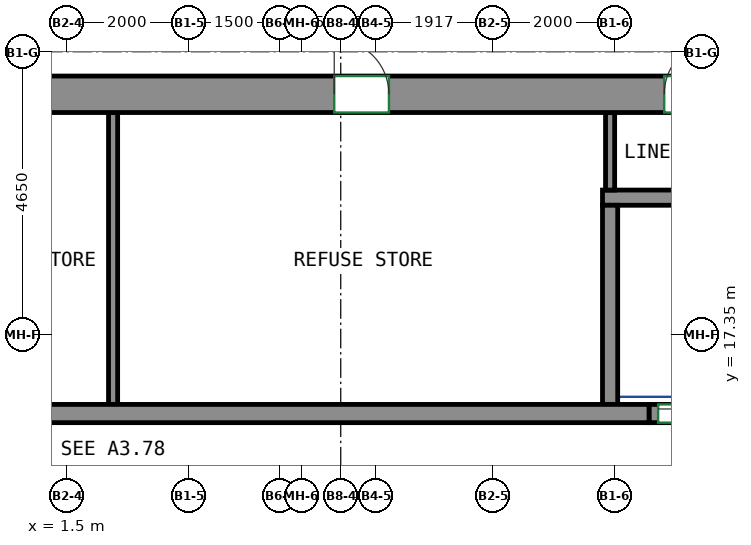
"""IFC4 building model, lengths in metres.
Left out: names, types, materials, properties, quantities, classifications, styles, units other than length and angle.
Written with IfcOpenShell. Run it as: python <this file> out.ifc"""

import sys

from ifc_helpers import new_model, si_unit, direction, frame, frame_2d, origin, place, context, subcontext, project, spatial, rectangle, extrude, source, transform, mapped, element, fill, save


model = new_model("IFC4")
c1 = context("Model", 3, precision=1e-05, world=origin(), true_north=direction((0.0, 1.0)))
c2 = subcontext(c1, "Body", "Model", "MODEL_VIEW")
j1 = project(units=[si_unit("LENGTHUNIT", "METRE"), si_unit("PLANEANGLEUNIT", "RADIAN")], contexts=[c1])
p1 = place(None, origin())
s1 = spatial("IfcSite", under=j1, at=p1, CompositionType="ELEMENT")
p2 = place(p1, origin())
s2 = spatial("IfcBuilding", under=s1, at=p2, CompositionType="ELEMENT")
p3 = place(p2, frame((0.0, 0.0, 308.6)))
s3 = spatial("IfcBuildingStorey", under=s2, at=p3, CompositionType="ELEMENT", Elevation=308.6)
m1 = source(origin(), c2, "Body", "SweptSolid", [
    extrude(rectangle(XDim=33.3, YDim=0.6, at=frame_2d((16.65, 0.0))), origin(), (0.0, 0.0, 1.0), 3.12),
])
p4 = place(p3, frame((-15.6, 21.3, 0.0), z_axis=(0.0, 0.0, 1.0), x_axis=(1.0, 0.0, 0.0)))
e1 = element("IfcWall", 1, at=p4, inside=s3, PredefinedType="SHEAR", context=c2, shape_type="MappedRepresentation", body=[
    mapped(m1, transform((0.0, 0.0, 0.0))),
])
p5 = place(p4, frame((5.708, 0.0, 0.0)))
e2 = element("IfcOpeningElement", 2, at=p5, cuts=e1, PredefinedType="OPENING", context=c2, shape_type="SweptSolid", body=[
    extrude(rectangle(XDim=0.9, YDim=2.1, at=frame_2d((0.45, 1.05))), frame((0.0, 0.31, 0.0), z_axis=(0.0, -1.0, 0.0), x_axis=(1.0, 0.0, 0.0)), (0.0, 0.0, 1.0), 0.62),
])
p6 = place(p4, frame((10.773, 0.0, 0.0)))
e3 = element("IfcOpeningElement", 3, at=p6, cuts=e1, PredefinedType="OPENING", context=c2, shape_type="SweptSolid", body=[
    extrude(rectangle(XDim=0.9, YDim=2.1, at=frame_2d((0.45, 1.05))), frame((0.0, 0.31, 0.0), z_axis=(0.0, -1.0, 0.0), x_axis=(1.0, 0.0, 0.0)), (0.0, 0.0, 1.0), 0.62),
])
p7 = place(p4, frame((15.838, 0.0, 0.0)))
e4 = element("IfcOpeningElement", 4, at=p7, cuts=e1, PredefinedType="OPENING", context=c2, shape_type="SweptSolid", body=[
    extrude(rectangle(XDim=0.9, YDim=2.1, at=frame_2d((0.45, 1.05))), frame((0.0, 0.31, 0.0), z_axis=(0.0, -1.0, 0.0), x_axis=(1.0, 0.0, 0.0)), (0.0, 0.0, 1.0), 0.62),
])
p8 = place(p4, frame((21.493, 0.0, 0.0)))
e5 = element("IfcOpeningElement", 5, at=p8, cuts=e1, PredefinedType="OPENING", context=c2, shape_type="SweptSolid", body=[
    extrude(rectangle(XDim=0.9, YDim=2.1, at=frame_2d((0.45, 1.05))), frame((0.0, 0.31, 0.0), z_axis=(0.0, -1.0, 0.0), x_axis=(1.0, 0.0, 0.0)), (0.0, 0.0, 1.0), 0.62),
])
p9 = place(p4, frame((26.92, 0.0, 0.0)))
e6 = element("IfcOpeningElement", 6, at=p9, cuts=e1, PredefinedType="OPENING", context=c2, shape_type="SweptSolid", body=[
    extrude(rectangle(XDim=0.9, YDim=2.1, at=frame_2d((0.45, 1.05))), frame((0.0, 0.31, 0.0), z_axis=(0.0, -1.0, 0.0), x_axis=(1.0, 0.0, 0.0)), (0.0, 0.0, 1.0), 0.62),
])
p10 = place(p4, frame((2.125, 0.0, 0.0)))
e7 = element("IfcOpeningElement", 7, at=p10, cuts=e1, PredefinedType="OPENING", context=c2, shape_type="SweptSolid", body=[
    extrude(rectangle(XDim=0.9, YDim=2.1, at=frame_2d((0.45, 1.05))), frame((0.0, 0.31, 0.0), z_axis=(0.0, -1.0, 0.0), x_axis=(1.0, 0.0, 0.0)), (0.0, 0.0, 1.0), 0.62),
])
p11 = place(p4, frame((30.275, 0.0, 0.0)))
e8 = element("IfcOpeningElement", 8, at=p11, cuts=e1, PredefinedType="OPENING", context=c2, shape_type="SweptSolid", body=[
    extrude(rectangle(XDim=0.9, YDim=2.1, at=frame_2d((0.45, 1.05))), frame((0.0, 0.31, 0.0), z_axis=(0.0, -1.0, 0.0), x_axis=(1.0, 0.0, 0.0)), (0.0, 0.0, 1.0), 0.62),
])
m2 = source(origin(), c2, "Body", "SweptSolid", [
    extrude(rectangle(XDim=22.08, YDim=0.3, at=frame_2d((11.04, 0.0))), origin(), (0.0, 0.0, 1.0), 3.12),
])
p12 = place(p3, frame((-11.01, 16.05, 0.0), z_axis=(0.0, 0.0, 1.0), x_axis=(1.0, 0.0, 0.0)))
e9 = element("IfcWall", 9, at=p12, inside=s3, PredefinedType="SHEAR", context=c2, shape_type="MappedRepresentation", body=[
    mapped(m2, transform((0.0, 0.0, 0.0))),
])
m3 = source(origin(), c2, "Body", "SweptSolid", [
    extrude(rectangle(XDim=1.4, YDim=0.3, at=frame_2d((0.7, 0.0))), origin(), (0.0, 0.0, 1.0), 3.12),
])
p13 = place(p3, frame((11.07, 16.05, 0.0), z_axis=(0.0, 0.0, 1.0), x_axis=(1.0, 0.0, 0.0)))
e10 = element("IfcWall", 10, at=p13, inside=s3, PredefinedType="PARTITIONING", context=c2, shape_type="MappedRepresentation", body=[
    mapped(m3, transform((0.0, 0.0, 0.0))),
])
p14 = place(p13, frame((0.15, 0.0, 0.0)))
e11 = element("IfcOpeningElement", 11, at=p14, cuts=e10, PredefinedType="OPENING", context=c2, shape_type="SweptSolid", body=[
    extrude(rectangle(XDim=1.1, YDim=2.1, at=frame_2d((0.55, 1.05))), frame((0.0, 0.16, 0.0), z_axis=(0.0, -1.0, 0.0), x_axis=(1.0, 0.0, 0.0)), (0.0, 0.0, 1.0), 0.32),
])
m4 = source(origin(), c2, "Body", "SweptSolid", [
    extrude(rectangle(XDim=2.93, YDim=0.25, at=frame_2d((1.465, 0.0))), origin(), (0.0, 0.0, 1.0), 3.12),
])
p15 = place(p3, frame((10.305, 19.6, 0.0), z_axis=(0.0, 0.0, 1.0), x_axis=(1.0, 0.0, 0.0)))
e12 = element("IfcWall", 12, at=p15, inside=s3, PredefinedType="PARTITIONING", context=c2, shape_type="MappedRepresentation", body=[
    mapped(m4, transform((0.0, 0.0, 0.0))),
])
m5 = source(origin(), c2, "Body", "SweptSolid", [
    extrude(rectangle(XDim=3.275, YDim=0.25, at=frame_2d((1.638, 0.0))), origin(), (0.0, 0.0, 1.0), 3.12),
])
p16 = place(p3, frame((10.43, 16.2, 0.0), z_axis=(0.0, 0.0, 1.0), x_axis=(0.0, 1.0, 0.0)))
e13 = element("IfcWall", 13, at=p16, inside=s3, PredefinedType="PARTITIONING", context=c2, shape_type="MappedRepresentation", body=[
    mapped(m5, transform((0.0, 0.0, 0.0))),
])
m6 = source(origin(), c2, "Body", "SweptSolid", [
    extrude(rectangle(XDim=4.8, YDim=0.15, at=frame_2d((2.4, 0.0))), origin(), (0.0, 0.0, 1.0), 3.12),
])
p17 = place(p3, frame((2.256, 16.2, 0.0), z_axis=(0.0, 0.0, 1.0), x_axis=(0.0, 1.0, 0.0)))
e14 = element("IfcWall", 14, at=p17, inside=s3, PredefinedType="PARTITIONING", context=c2, shape_type="MappedRepresentation", body=[
    mapped(m6, transform((0.0, 0.0, 0.0))),
])
m7 = source(origin(), c2, "Body", "SweptSolid", [
    extrude(rectangle(XDim=1.275, YDim=0.15, at=frame_2d((0.637, 0.0))), origin(), (0.0, 0.0, 1.0), 3.12),
])
p18 = place(p3, frame((10.43, 19.725, 0.0), z_axis=(0.0, 0.0, 1.0), x_axis=(0.0, 1.0, 0.0)))
e15 = element("IfcWall", 15, at=p18, inside=s3, PredefinedType="PARTITIONING", context=c2, shape_type="MappedRepresentation", body=[
    mapped(m7, transform((0.0, 0.0, 0.0))),
])
p19 = place(p14, origin())
e16 = element("IfcDoor", 16, at=p19, inside=s3, OperationType="DOUBLE_DOOR_SLIDING", PredefinedType="DOOR", context=c2, shape_type="SweptSolid", body=[
    extrude(rectangle(XDim=1.1, YDim=2.1, at=frame_2d((0.55, 1.05))), frame((0.0, 0.025, 0.0), z_axis=(0.0, -1.0, 0.0), x_axis=(1.0, 0.0, 0.0)), (0.0, 0.0, 1.0), 0.05),
])
fill(e11, e16)
p20 = place(p8, origin())
e17 = element("IfcDoor", 17, at=p20, inside=s3, OperationType="SINGLE_SWING_LEFT", PredefinedType="DOOR", context=c2, shape_type="SweptSolid", body=[
    extrude(rectangle(XDim=0.9, YDim=2.1, at=frame_2d((0.45, 1.05))), frame((0.0, -0.155, 0.0), z_axis=(0.0, -1.0, 0.0), x_axis=(1.0, 0.0, 0.0)), (0.0, 0.0, 1.0), 0.05),
])
fill(e5, e17)
p21 = place(p9, origin())
e18 = element("IfcDoor", 18, at=p21, inside=s3, OperationType="SINGLE_SWING_RIGHT", PredefinedType="DOOR", context=c2, shape_type="SweptSolid", body=[
    extrude(rectangle(XDim=0.9, YDim=2.1, at=frame_2d((0.45, 1.05))), frame((0.0, -0.155, 0.0), z_axis=(0.0, -1.0, 0.0), x_axis=(1.0, 0.0, 0.0)), (0.0, 0.0, 1.0), 0.05),
])
fill(e6, e18)
save(model, sys.argv[1])
